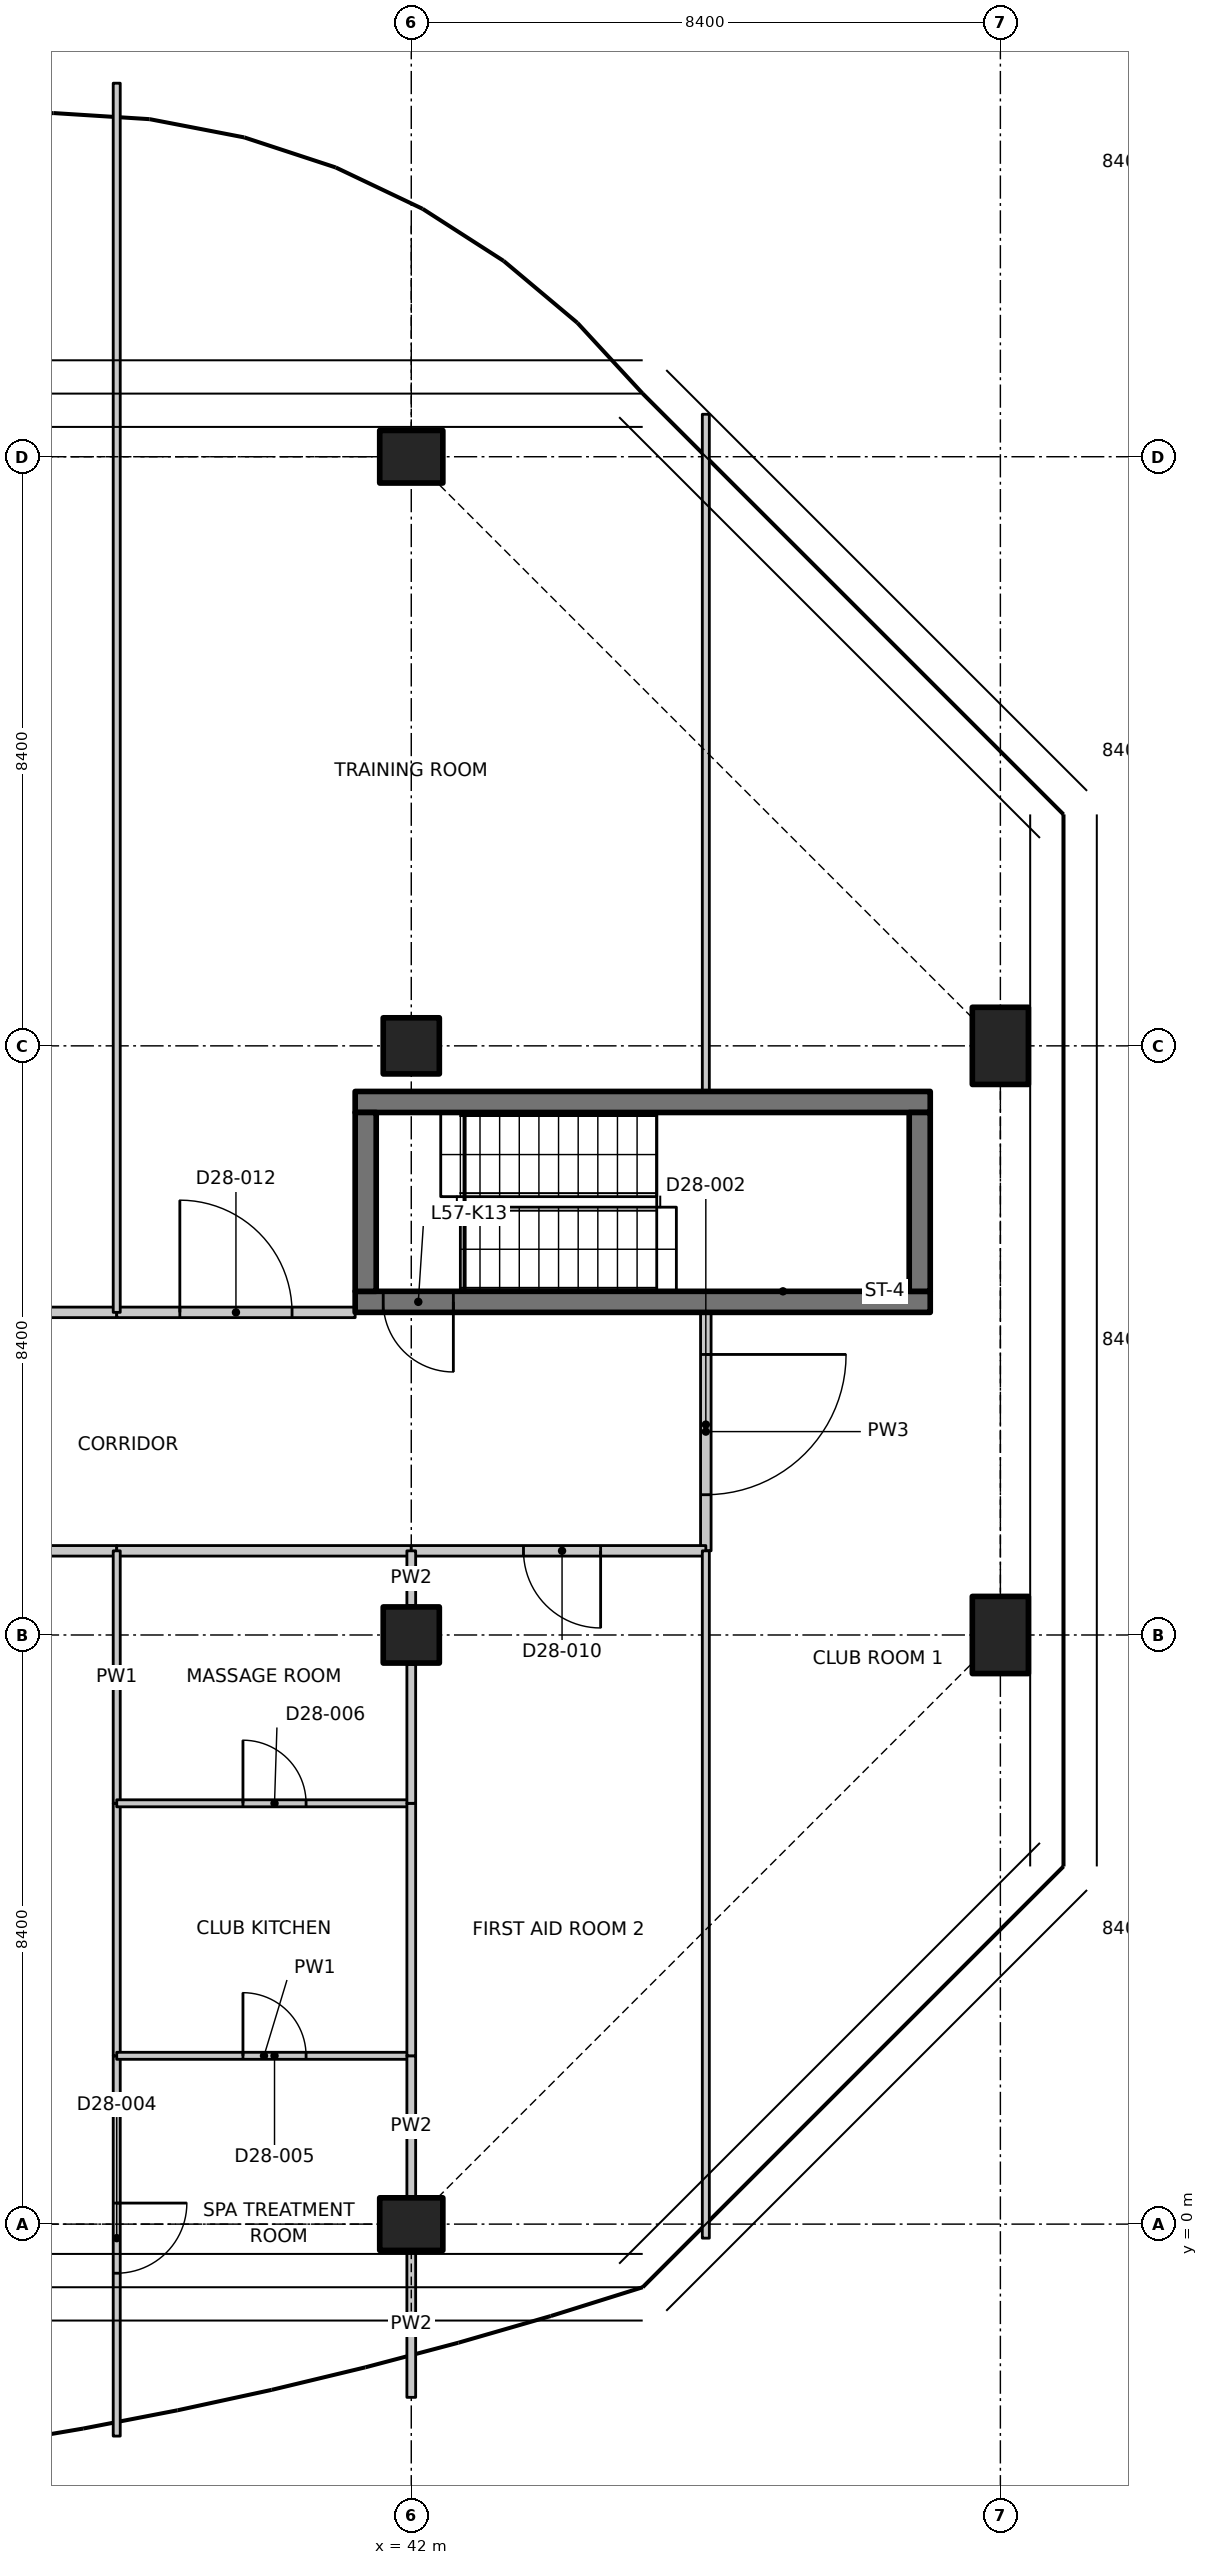
"""IFC4 building model, lengths in metres.
Left out: names, types, materials, properties, quantities, classifications, styles, units other than length and angle.
Written with IfcOpenShell. Run it as: python <this file> out.ifc"""

import sys

from ifc_helpers import new_model, si_unit, direction, frame, frame_2d, origin, origin_2d, place, context, subcontext, project, spatial, polyline, rectangle, outline, extrude, element, fill, save


model = new_model("IFC4")
c1 = context("Model", 3, precision=1e-05, world=origin(), true_north=direction((0.0, 1.0)))
c2 = subcontext(c1, "Body", "Model", "MODEL_VIEW")
j1 = project(units=[si_unit("LENGTHUNIT", "METRE"), si_unit("PLANEANGLEUNIT", "RADIAN")], contexts=[c1])
p1 = place(None, origin())
s1 = spatial("IfcSite", under=j1, at=p1, CompositionType="ELEMENT")
p2 = place(p1, origin())
s2 = spatial("IfcBuilding", under=s1, at=p2, CompositionType="ELEMENT")
p3 = place(p2, frame((0.0, 0.0, 226.5)))
s3 = spatial("IfcBuildingStorey", under=s2, at=p3, CompositionType="ELEMENT", Elevation=226.5)
p4 = place(p3, frame((42.0, 0.0, 0.0), z_axis=(0.0, 0.0, 1.0), x_axis=(0.0, 1.0, 0.0)))
e1 = element("IfcColumn", 1, at=p4, inside=s3, PredefinedType="COLUMN", context=c2, shape_type="SweptSolid", body=[
    extrude(rectangle(XDim=0.75, YDim=0.9, at=origin_2d()), origin(), (0.0, 0.0, 1.0), 3.35),
])
for number, where, z_axis, x_axis in (
    (2, (42.0, 8.4, 0.0), (0.0, 0.0, 1.0), (1.0, 0.0, 0.0)),
    (3, (42.0, 16.8, 0.0), (0.0, 0.0, 1.0), (1.0, 0.0, 0.0)),
):
    element("IfcColumn", number, at=place(p3, frame(where, z_axis=z_axis, x_axis=x_axis)), inside=s3, PredefinedType="COLUMN", context=c2, shape_type="SweptSolid", body=[
        extrude(rectangle(XDim=0.8, YDim=0.8, at=origin_2d()), origin(), (0.0, 0.0, 1.0), 3.35),
    ])
p5 = place(p3, frame((42.0, 25.2, 0.0), z_axis=(0.0, 0.0, 1.0), x_axis=(0.0, 1.0, 0.0)))
e4 = element("IfcColumn", 4, at=p5, inside=s3, PredefinedType="COLUMN", context=c2, shape_type="SweptSolid", body=[
    extrude(rectangle(XDim=0.75, YDim=0.9, at=origin_2d()), origin(), (0.0, 0.0, 1.0), 3.35),
])
for number, where, z_axis, x_axis in (
    (5, (50.4, 8.4, 0.0), (0.0, 0.0, 1.0), (1.0, 0.0, 0.0)),
    (6, (50.4, 16.8, 0.0), (0.0, 0.0, 1.0), (1.0, 0.0, 0.0)),
):
    element("IfcColumn", number, at=place(p3, frame(where, z_axis=z_axis, x_axis=x_axis)), inside=s3, PredefinedType="COLUMN", context=c2, shape_type="SweptSolid", body=[
        extrude(rectangle(XDim=0.8, YDim=1.1, at=origin_2d()), origin(), (0.0, 0.0, 1.0), 3.35),
    ])
p6 = place(p3, frame((49.4, 13.15, 0.0), z_axis=(0.0, 0.0, 1.0), x_axis=(-1.0, 0.0, 0.0)))
e7 = element("IfcWall", 7, at=p6, inside=s3, PredefinedType="SHEAR", context=c2, shape_type="SweptSolid", body=[
    extrude(rectangle(XDim=8.2, YDim=0.3, at=frame_2d((4.1, 0.0))), origin(), (0.0, 0.0, 1.0), 3.35),
])
p7 = place(p6, frame((6.8, 0.0, 0.0)))
e8 = element("IfcOpeningElement", 8, at=p7, cuts=e7, PredefinedType="OPENING", context=c2, shape_type="SweptSolid", body=[
    extrude(rectangle(XDim=1.0, YDim=2.1, at=frame_2d((0.5, 1.05))), frame((0.0, 0.16, 0.0), z_axis=(0.0, -1.0, 0.0), x_axis=(1.0, 0.0, 0.0)), (0.0, 0.0, 1.0), 0.32),
])
p8 = place(p3, frame((41.2, 16.0, 0.0), z_axis=(0.0, 0.0, 1.0), x_axis=(1.0, 0.0, 0.0)))
e9 = element("IfcWall", 9, at=p8, inside=s3, PredefinedType="SHEAR", context=c2, shape_type="SweptSolid", body=[
    extrude(rectangle(XDim=8.2, YDim=0.3, at=frame_2d((4.1, 0.0))), origin(), (0.0, 0.0, 1.0), 3.35),
])
for number, where, z_axis, x_axis in (
    (10, (41.35, 13.3, 0.0), (0.0, 0.0, 1.0), (0.0, 1.0, 0.0)),
    (11, (49.25, 13.3, 0.0), (0.0, 0.0, 1.0), (0.0, 1.0, 0.0)),
):
    element("IfcWall", number, at=place(p3, frame(where, z_axis=z_axis, x_axis=x_axis)), inside=s3, PredefinedType="SHEAR", context=c2, shape_type="SweptSolid", body=[
        extrude(rectangle(XDim=2.55, YDim=0.3, at=frame_2d((1.275, 0.0))), origin(), (0.0, 0.0, 1.0), 3.35),
    ])
p9 = place(p3, frame((46.2, 13.0, 0.0), z_axis=(0.0, 0.0, 1.0), x_axis=(0.0, -1.0, 0.0)))
e12 = element("IfcWall", 12, at=p9, inside=s3, PredefinedType="PARTITIONING", context=c2, shape_type="SweptSolid", body=[
    extrude(rectangle(XDim=3.4, YDim=0.15, at=frame_2d((1.7, 0.0))), origin(), (0.0, 0.0, 1.0), 3.33),
])
p10 = place(p9, frame((0.6, 0.0, 0.0)))
e13 = element("IfcOpeningElement", 13, at=p10, cuts=e12, PredefinedType="OPENING", context=c2, shape_type="SweptSolid", body=[
    extrude(rectangle(XDim=2.0, YDim=2.4, at=frame_2d((1.0, 1.2))), frame((0.0, 0.085, 0.0), z_axis=(0.0, -1.0, 0.0), x_axis=(1.0, 0.0, 0.0)), (0.0, 0.0, 1.0), 0.17),
])
p11 = place(p3, frame((37.8, 9.6, 0.0), z_axis=(0.0, 0.0, 1.0), x_axis=(-1.0, 0.0, 0.0)))
e14 = element("IfcWall", 14, at=p11, inside=s3, PredefinedType="PARTITIONING", context=c2, shape_type="SweptSolid", body=[
    extrude(rectangle(XDim=8.4, YDim=0.15, at=frame_2d((4.2, 0.0))), origin(), (0.0, 0.0, 1.0), 3.33),
])
p12 = place(p11, frame((4.8, 0.0, 0.0)))
e15 = element("IfcOpeningElement", 15, at=p12, cuts=e14, PredefinedType="OPENING", context=c2, shape_type="SweptSolid", body=[
    extrude(rectangle(XDim=2.0, YDim=2.4, at=frame_2d((1.0, 1.2))), frame((0.0, 0.085, 0.0), z_axis=(0.0, -1.0, 0.0), x_axis=(1.0, 0.0, 0.0)), (0.0, 0.0, 1.0), 0.17),
])
p13 = place(p3, frame((42.0, 9.6, 0.0), z_axis=(0.0, 0.0, 1.0), x_axis=(-1.0, 0.0, 0.0)))
e16 = element("IfcWall", 16, at=p13, inside=s3, PredefinedType="PARTITIONING", context=c2, shape_type="SweptSolid", body=[
    extrude(rectangle(XDim=4.2, YDim=0.15, at=frame_2d((2.1, 0.0))), origin(), (0.0, 0.0, 1.0), 3.33),
])
p14 = place(p3, frame((46.2, 9.6, 0.0), z_axis=(0.0, 0.0, 1.0), x_axis=(-1.0, 0.0, 0.0)))
e17 = element("IfcWall", 17, at=p14, inside=s3, PredefinedType="PARTITIONING", context=c2, shape_type="SweptSolid", body=[
    extrude(rectangle(XDim=4.2, YDim=0.15, at=frame_2d((2.1, 0.0))), origin(), (0.0, 0.0, 1.0), 3.33),
])
p15 = place(p14, frame((1.5, 0.0, 0.0)))
e18 = element("IfcOpeningElement", 18, at=p15, cuts=e17, PredefinedType="OPENING", context=c2, shape_type="SweptSolid", body=[
    extrude(rectangle(XDim=1.1, YDim=2.1, at=frame_2d((0.55, 1.05))), frame((0.0, 0.085, 0.0), z_axis=(0.0, -1.0, 0.0), x_axis=(1.0, 0.0, 0.0)), (0.0, 0.0, 1.0), 0.17),
])
p16 = place(p3, frame((29.4, 13.0, 0.0), z_axis=(0.0, 0.0, 1.0), x_axis=(1.0, 0.0, 0.0)))
e19 = element("IfcWall", 19, at=p16, inside=s3, PredefinedType="PARTITIONING", context=c2, shape_type="SweptSolid", body=[
    extrude(rectangle(XDim=8.4, YDim=0.15, at=frame_2d((4.2, 0.0))), origin(), (0.0, 0.0, 1.0), 3.33),
])
p17 = place(p16, frame((3.3, 0.0, 0.0)))
e20 = element("IfcOpeningElement", 20, at=p17, cuts=e19, PredefinedType="OPENING", context=c2, shape_type="SweptSolid", body=[
    extrude(rectangle(XDim=1.8, YDim=2.1, at=frame_2d((0.9, 1.05))), frame((0.0, 0.085, 0.0), z_axis=(0.0, -1.0, 0.0), x_axis=(1.0, 0.0, 0.0)), (0.0, 0.0, 1.0), 0.17),
])
p18 = place(p3, frame((37.8, 13.0, 0.0), z_axis=(0.0, 0.0, 1.0), x_axis=(1.0, 0.0, 0.0)))
e21 = element("IfcWall", 21, at=p18, inside=s3, PredefinedType="PARTITIONING", context=c2, shape_type="SweptSolid", body=[
    extrude(rectangle(XDim=3.4, YDim=0.15, at=frame_2d((1.7, 0.0))), origin(), (0.0, 0.0, 1.0), 3.33),
])
p19 = place(p18, frame((0.9, 0.0, 0.0)))
e22 = element("IfcOpeningElement", 22, at=p19, cuts=e21, PredefinedType="OPENING", context=c2, shape_type="SweptSolid", body=[
    extrude(rectangle(XDim=1.6, YDim=2.1, at=frame_2d((0.8, 1.05))), frame((0.0, 0.085, 0.0), z_axis=(0.0, -1.0, 0.0), x_axis=(1.0, 0.0, 0.0)), (0.0, 0.0, 1.0), 0.17),
])
p20 = place(p3, frame((46.2, -0.2, 0.0), z_axis=(0.0, 0.0, 1.0), x_axis=(0.0, 1.0, 0.0)))
e23 = element("IfcWall", 23, at=p20, inside=s3, PredefinedType="PARTITIONING", context=c2, shape_type="SweptSolid", body=[
    extrude(outline(polyline([(0.0, 0.0), (9.8, 0.0), (9.8, 3.33), (5.066, 3.33), (5.064, 2.98), (3.736, 2.98), (3.734, 3.33), (0.0, 3.33), (0.0, 0.0)])), frame((0.0, 0.05, 0.0), z_axis=(0.0, -1.0, 0.0), x_axis=(1.0, 0.0, 0.0)), (0.0, 0.0, 1.0), 0.1),
])
p21 = place(p3, frame((46.2, 16.15, 0.0), z_axis=(0.0, 0.0, 1.0), x_axis=(0.0, 1.0, 0.0)))
e24 = element("IfcWall", 24, at=p21, inside=s3, PredefinedType="PARTITIONING", context=c2, shape_type="SweptSolid", body=[
    extrude(outline(polyline([(0.0, 0.0), (9.656, 0.0), (9.656, 3.33), (9.25, 3.33), (5.516, 3.33), (5.514, 2.98), (4.186, 2.98), (4.184, 3.33), (0.0, 3.33), (0.0, 0.0)])), frame((0.0, 0.05, 0.0), z_axis=(0.0, -1.0, 0.0), x_axis=(1.0, 0.0, 0.0)), (0.0, 0.0, 1.0), 0.1),
])
p22 = place(p3, frame((37.8, 2.4, 0.0), z_axis=(0.0, 0.0, 1.0), x_axis=(0.0, -1.0, 0.0)))
e25 = element("IfcWall", 25, at=p22, inside=s3, PredefinedType="PARTITIONING", context=c2, shape_type="SweptSolid", body=[
    extrude(outline(polyline([(0.0, 0.0), (5.422, 0.0), (5.422, 3.33), (2.85, 3.33), (2.848, 2.98), (1.952, 2.98), (1.95, 3.33), (0.0, 3.33), (0.0, 0.0)])), frame((0.0, 0.05, 0.0), z_axis=(0.0, -1.0, 0.0), x_axis=(1.0, 0.0, 0.0)), (0.0, 0.0, 1.0), 0.1),
])
p23 = place(p22, frame((2.1, 0.0, 0.0)))
e26 = element("IfcOpeningElement", 26, at=p23, cuts=e25, PredefinedType="OPENING", context=c2, shape_type="SweptSolid", body=[
    extrude(rectangle(XDim=1.0, YDim=2.1, at=frame_2d((0.5, 1.05))), frame((0.0, 0.06, 0.0), z_axis=(0.0, -1.0, 0.0), x_axis=(1.0, 0.0, 0.0)), (0.0, 0.0, 1.0), 0.12),
])
for number, where, z_axis, x_axis in (
    (27, (37.8, 6.0, 0.0), (0.0, 0.0, 1.0), (0.0, -1.0, 0.0)),
    (28, (37.8, 9.6, 0.0), (0.0, 0.0, 1.0), (0.0, -1.0, 0.0)),
):
    element("IfcWall", number, at=place(p3, frame(where, z_axis=z_axis, x_axis=x_axis)), inside=s3, PredefinedType="PARTITIONING", context=c2, shape_type="SweptSolid", body=[
        extrude(rectangle(XDim=3.6, YDim=0.1, at=frame_2d((1.8, 0.0))), origin(), (0.0, 0.0, 1.0), 3.33),
    ])
p24 = place(p3, frame((37.8, 2.4, 0.0), z_axis=(0.0, 0.0, 1.0), x_axis=(1.0, 0.0, 0.0)))
e29 = element("IfcWall", 29, at=p24, inside=s3, PredefinedType="PARTITIONING", context=c2, shape_type="SweptSolid", body=[
    extrude(rectangle(XDim=4.2, YDim=0.1, at=frame_2d((2.1, 0.0))), origin(), (0.0, 0.0, 1.0), 3.33),
])
p25 = place(p24, frame((1.8, 0.0, 0.0)))
e30 = element("IfcOpeningElement", 30, at=p25, cuts=e29, PredefinedType="OPENING", context=c2, shape_type="SweptSolid", body=[
    extrude(rectangle(XDim=0.9, YDim=2.1, at=frame_2d((0.45, 1.05))), frame((0.0, 0.06, 0.0), z_axis=(0.0, -1.0, 0.0), x_axis=(1.0, 0.0, 0.0)), (0.0, 0.0, 1.0), 0.12),
])
p26 = place(p3, frame((42.0, 2.4, 0.0), z_axis=(0.0, 0.0, 1.0), x_axis=(0.0, -1.0, 0.0)))
e31 = element("IfcWall", 31, at=p26, inside=s3, PredefinedType="PARTITIONING", context=c2, shape_type="SweptSolid", body=[
    extrude(rectangle(XDim=2.005, YDim=0.125, at=frame_2d((1.002, 0.0))), origin(), (0.0, 0.0, 1.0), 2.98),
])
p27 = place(p3, frame((42.0, -0.395, 0.0), z_axis=(0.0, 0.0, 1.0), x_axis=(0.0, -1.0, 0.0)))
e32 = element("IfcWall", 32, at=p27, inside=s3, PredefinedType="PARTITIONING", context=c2, shape_type="SweptSolid", body=[
    extrude(rectangle(XDim=2.075, YDim=0.125, at=frame_2d((1.038, 0.0))), origin(), (0.0, 0.0, 1.0), 2.98),
])
p28 = place(p3, frame((37.8, 6.0, 0.0), z_axis=(0.0, 0.0, 1.0), x_axis=(1.0, 0.0, 0.0)))
e33 = element("IfcWall", 33, at=p28, inside=s3, PredefinedType="PARTITIONING", context=c2, shape_type="SweptSolid", body=[
    extrude(rectangle(XDim=4.2, YDim=0.1, at=frame_2d((2.1, 0.0))), origin(), (0.0, 0.0, 1.0), 3.33),
])
p29 = place(p28, frame((1.8, 0.0, 0.0)))
e34 = element("IfcOpeningElement", 34, at=p29, cuts=e33, PredefinedType="OPENING", context=c2, shape_type="SweptSolid", body=[
    extrude(rectangle(XDim=0.9, YDim=2.1, at=frame_2d((0.45, 1.05))), frame((0.0, 0.06, 0.0), z_axis=(0.0, -1.0, 0.0), x_axis=(1.0, 0.0, 0.0)), (0.0, 0.0, 1.0), 0.12),
])
p30 = place(p3, frame((42.0, 6.0, 0.0), z_axis=(0.0, 0.0, 1.0), x_axis=(0.0, -1.0, 0.0)))
e35 = element("IfcWall", 35, at=p30, inside=s3, PredefinedType="PARTITIONING", context=c2, shape_type="SweptSolid", body=[
    extrude(rectangle(XDim=3.6, YDim=0.125, at=frame_2d((1.8, 0.0))), origin(), (0.0, 0.0, 1.0), 3.33),
])
p31 = place(p3, frame((42.0, 9.6, 0.0), z_axis=(0.0, 0.0, 1.0), x_axis=(0.0, -1.0, 0.0)))
e36 = element("IfcWall", 36, at=p31, inside=s3, PredefinedType="PARTITIONING", context=c2, shape_type="SweptSolid", body=[
    extrude(rectangle(XDim=0.78, YDim=0.125, at=frame_2d((0.39, 0.0))), origin(), (0.0, 0.0, 1.0), 3.33),
])
p32 = place(p3, frame((42.0, 7.98, 0.0), z_axis=(0.0, 0.0, 1.0), x_axis=(0.0, -1.0, 0.0)))
e37 = element("IfcWall", 37, at=p32, inside=s3, PredefinedType="PARTITIONING", context=c2, shape_type="SweptSolid", body=[
    extrude(rectangle(XDim=1.98, YDim=0.125, at=frame_2d((0.99, 0.0))), origin(), (0.0, 0.0, 1.0), 3.33),
])
p33 = place(p3, frame((37.8, 30.526, 0.0), z_axis=(0.0, 0.0, 1.0), x_axis=(0.0, -1.0, 0.0)))
e38 = element("IfcWall", 38, at=p33, inside=s3, PredefinedType="PARTITIONING", context=c2, shape_type="SweptSolid", body=[
    extrude(outline(polyline([(0.0, 0.0), (17.526, 0.0), (17.526, 3.33), (5.776, 3.33), (5.774, 2.98), (4.878, 2.98), (4.876, 3.33), (0.283, 3.33), (0.0, 3.33), (0.0, 0.0)])), frame((0.0, 0.05, 0.0), z_axis=(0.0, -1.0, 0.0), x_axis=(1.0, 0.0, 0.0)), (0.0, 0.0, 1.0), 0.1),
])
p34 = place(p7, origin())
e39 = element("IfcDoor", 39, at=p34, inside=s3, OperationType="SINGLE_SWING_LEFT", PredefinedType="DOOR", context=c2, shape_type="SweptSolid", body=[
    extrude(rectangle(XDim=1.0, YDim=2.1, at=frame_2d((0.5, 1.05))), frame((0.0, 0.025, 0.0), z_axis=(0.0, -1.0, 0.0), x_axis=(1.0, 0.0, 0.0)), (0.0, 0.0, 1.0), 0.05),
])
fill(e8, e39)
p35 = place(p10, origin())
e40 = element("IfcDoor", 40, at=p35, inside=s3, OperationType="DOUBLE_DOOR_SINGLE_SWING", PredefinedType="DOOR", context=c2, shape_type="SweptSolid", body=[
    extrude(rectangle(XDim=2.0, YDim=2.4, at=frame_2d((1.0, 1.2))), frame((0.0, 0.025, 0.0), z_axis=(0.0, -1.0, 0.0), x_axis=(1.0, 0.0, 0.0)), (0.0, 0.0, 1.0), 0.05),
])
fill(e13, e40)
p36 = place(p23, origin())
e41 = element("IfcDoor", 41, at=p36, inside=s3, OperationType="SINGLE_SWING_LEFT", PredefinedType="DOOR", context=c2, shape_type="SweptSolid", body=[
    extrude(rectangle(XDim=1.0, YDim=2.1, at=frame_2d((0.5, 1.05))), frame((0.0, 0.025, 0.0), z_axis=(0.0, -1.0, 0.0), x_axis=(1.0, 0.0, 0.0)), (0.0, 0.0, 1.0), 0.05),
])
fill(e26, e41)
p37 = place(p25, origin())
e42 = element("IfcDoor", 42, at=p37, inside=s3, OperationType="SINGLE_SWING_LEFT", PredefinedType="DOOR", context=c2, shape_type="SweptSolid", body=[
    extrude(rectangle(XDim=0.9, YDim=2.1, at=frame_2d((0.45, 1.05))), frame((0.0, 0.025, 0.0), z_axis=(0.0, -1.0, 0.0), x_axis=(1.0, 0.0, 0.0)), (0.0, 0.0, 1.0), 0.05),
])
fill(e30, e42)
p38 = place(p29, origin())
e43 = element("IfcDoor", 43, at=p38, inside=s3, OperationType="SINGLE_SWING_LEFT", PredefinedType="DOOR", context=c2, shape_type="SweptSolid", body=[
    extrude(rectangle(XDim=0.9, YDim=2.1, at=frame_2d((0.45, 1.05))), frame((0.0, 0.025, 0.0), z_axis=(0.0, -1.0, 0.0), x_axis=(1.0, 0.0, 0.0)), (0.0, 0.0, 1.0), 0.05),
])
fill(e34, e43)
p39 = place(p15, origin())
e44 = element("IfcDoor", 44, at=p39, inside=s3, OperationType="SINGLE_SWING_LEFT", PredefinedType="DOOR", context=c2, shape_type="SweptSolid", body=[
    extrude(rectangle(XDim=1.1, YDim=2.1, at=frame_2d((0.55, 1.05))), frame((0.0, 0.025, 0.0), z_axis=(0.0, -1.0, 0.0), x_axis=(1.0, 0.0, 0.0)), (0.0, 0.0, 1.0), 0.05),
])
fill(e18, e44)
p40 = place(p19, origin())
e45 = element("IfcDoor", 45, at=p40, inside=s3, OperationType="DOUBLE_DOOR_SINGLE_SWING", PredefinedType="DOOR", context=c2, shape_type="SweptSolid", body=[
    extrude(rectangle(XDim=1.6, YDim=2.1, at=frame_2d((0.8, 1.05))), frame((0.0, 0.025, 0.0), z_axis=(0.0, -1.0, 0.0), x_axis=(1.0, 0.0, 0.0)), (0.0, 0.0, 1.0), 0.05),
])
fill(e22, e45)
save(model, sys.argv[1])
